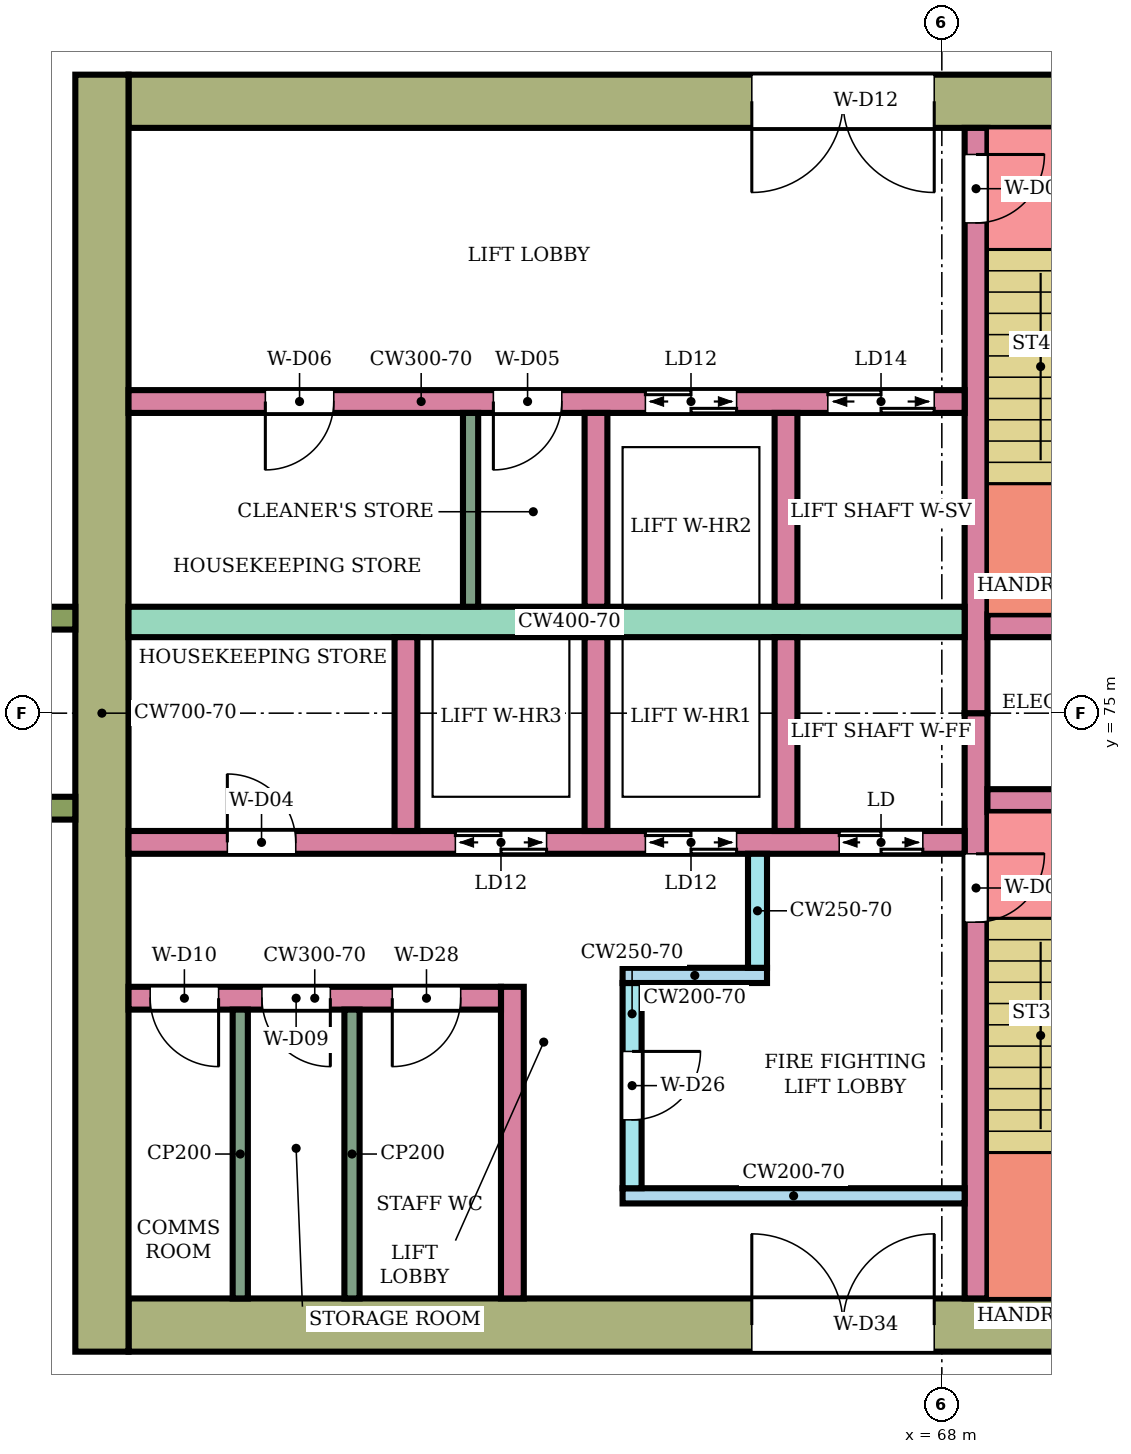
"""IFC4 building model, lengths in metres.
Left out: names, types, materials, properties, quantities, classifications, styles, units other than length and angle.
Written with IfcOpenShell. Run it as: python <this file> out.ifc"""

import sys

from ifc_helpers import new_model, si_unit, direction, frame, frame_2d, origin, place, context, subcontext, project, spatial, rectangle, extrude, element, fill, save


model = new_model("IFC4")
c1 = context("Model", 3, precision=1e-05, world=origin(), true_north=direction((0.0, 1.0)))
c2 = subcontext(c1, "Body", "Model", "MODEL_VIEW")
j1 = project(units=[si_unit("LENGTHUNIT", "METRE"), si_unit("PLANEANGLEUNIT", "RADIAN")], contexts=[c1])
p1 = place(None, origin())
s1 = spatial("IfcSite", under=j1, at=p1, CompositionType="ELEMENT")
p2 = place(p1, origin())
s2 = spatial("IfcBuilding", under=s1, at=p2, CompositionType="ELEMENT")
p3 = place(p2, frame((0.0, 0.0, 194.6)))
s3 = spatial("IfcBuildingStorey", under=s2, at=p3, CompositionType="ELEMENT", Elevation=194.6)
p4 = place(p3, frame((72.1, 66.95, 0.0), z_axis=(0.0, 0.0, 1.0), x_axis=(-1.0, 0.0, 0.0)))
e1 = element("IfcWall", 1, at=p4, inside=s3, PredefinedType="SHEAR", context=c2, shape_type="SweptSolid", body=[
    extrude(rectangle(XDim=14.8, YDim=0.7, at=frame_2d((7.4, 0.0))), origin(), (0.0, 0.0, 1.0), 3.78),
])
p5 = place(p4, frame((4.2, 0.0, 0.0)))
e2 = element("IfcOpeningElement", 2, at=p5, cuts=e1, PredefinedType="OPENING", context=c2, shape_type="SweptSolid", body=[
    extrude(rectangle(XDim=2.4, YDim=2.4, at=frame_2d((1.2, 1.2))), frame((0.0, 0.36, 0.0), z_axis=(0.0, -1.0, 0.0), x_axis=(1.0, 0.0, 0.0)), (0.0, 0.0, 1.0), 0.72),
])
p6 = place(p3, frame((72.1, 83.05, 0.0), z_axis=(0.0, 0.0, 1.0), x_axis=(-1.0, 0.0, 0.0)))
e3 = element("IfcWall", 3, at=p6, inside=s3, PredefinedType="SHEAR", context=c2, shape_type="SweptSolid", body=[
    extrude(rectangle(XDim=14.8, YDim=0.7, at=frame_2d((7.4, 0.0))), origin(), (0.0, 0.0, 1.0), 3.78),
])
p7 = place(p6, frame((4.2, 0.0, 0.0)))
e4 = element("IfcOpeningElement", 4, at=p7, cuts=e3, PredefinedType="OPENING", context=c2, shape_type="SweptSolid", body=[
    extrude(rectangle(XDim=2.4, YDim=2.4, at=frame_2d((1.2, 1.2))), frame((0.0, 0.36, 0.0), z_axis=(0.0, -1.0, 0.0), x_axis=(1.0, 0.0, 0.0)), (0.0, 0.0, 1.0), 0.72),
])
p8 = place(p3, frame((56.95, 83.4, 0.0), z_axis=(0.0, 0.0, 1.0), x_axis=(0.0, -1.0, 0.0)))
e5 = element("IfcWall", 5, at=p8, inside=s3, PredefinedType="SHEAR", context=c2, shape_type="SweptSolid", body=[
    extrude(rectangle(XDim=16.8, YDim=0.7, at=frame_2d((8.4, 0.0))), origin(), (0.0, 0.0, 1.0), 3.78),
])
p9 = place(p3, frame((68.45, 75.0, 0.0), z_axis=(0.0, 0.0, 1.0), x_axis=(0.0, -1.0, 0.0)))
e6 = element("IfcWall", 6, at=p9, inside=s3, PredefinedType="SHEAR", context=c2, shape_type="SweptSolid", body=[
    extrude(rectangle(XDim=7.7, YDim=0.3, at=frame_2d((3.85, 0.0))), origin(), (0.0, 0.0, 1.0), 3.78),
])
p10 = place(p9, frame((1.85, 0.0, 0.0)))
e7 = element("IfcOpeningElement", 7, at=p10, cuts=e6, PredefinedType="OPENING", context=c2, shape_type="SweptSolid", body=[
    extrude(rectangle(XDim=0.9, YDim=2.1, at=frame_2d((0.45, 1.05))), frame((0.0, 0.16, 0.0), z_axis=(0.0, -1.0, 0.0), x_axis=(1.0, 0.0, 0.0)), (0.0, 0.0, 1.0), 0.32),
])
p11 = place(p3, frame((68.45, 82.7, 0.0), z_axis=(0.0, 0.0, 1.0), x_axis=(0.0, -1.0, 0.0)))
e8 = element("IfcWall", 8, at=p11, inside=s3, PredefinedType="SHEAR", context=c2, shape_type="SweptSolid", body=[
    extrude(rectangle(XDim=7.7, YDim=0.3, at=frame_2d((3.85, 0.0))), origin(), (0.0, 0.0, 1.0), 3.78),
])
p12 = place(p11, frame((0.35, 0.0, 0.0)))
e9 = element("IfcOpeningElement", 9, at=p12, cuts=e8, PredefinedType="OPENING", context=c2, shape_type="SweptSolid", body=[
    extrude(rectangle(XDim=0.9, YDim=2.1, at=frame_2d((0.45, 1.05))), frame((0.0, 0.16, 0.0), z_axis=(0.0, -1.0, 0.0), x_axis=(1.0, 0.0, 0.0)), (0.0, 0.0, 1.0), 0.32),
])
p13 = place(p3, frame((71.65, 73.85, 0.0), z_axis=(0.0, 0.0, 1.0), x_axis=(-1.0, 0.0, 0.0)))
e10 = element("IfcWall", 10, at=p13, inside=s3, PredefinedType="SHEAR", context=c2, shape_type="SweptSolid", body=[
    extrude(rectangle(XDim=3.05, YDim=0.3, at=frame_2d((1.525, 0.0))), origin(), (0.0, 0.0, 1.0), 3.78),
])
p14 = place(p13, frame((1.1, 0.0, 0.0)))
e11 = element("IfcOpeningElement", 11, at=p14, cuts=e10, PredefinedType="OPENING", context=c2, shape_type="SweptSolid", body=[
    extrude(rectangle(XDim=0.7, YDim=2.0, at=frame_2d((0.35, 1.0))), frame((0.0, 0.16, 0.0), z_axis=(0.0, -1.0, 0.0), x_axis=(1.0, 0.0, 0.0)), (0.0, 0.0, 1.0), 0.32),
])
p15 = place(p3, frame((71.65, 76.15, 0.0), z_axis=(0.0, 0.0, 1.0), x_axis=(-1.0, 0.0, 0.0)))
e12 = element("IfcWall", 12, at=p15, inside=s3, PredefinedType="SHEAR", context=c2, shape_type="SweptSolid", body=[
    extrude(rectangle(XDim=3.05, YDim=0.3, at=frame_2d((1.525, 0.0))), origin(), (0.0, 0.0, 1.0), 3.78),
])
p16 = place(p3, frame((68.3, 73.3, 0.0), z_axis=(0.0, 0.0, 1.0), x_axis=(-1.0, 0.0, 0.0)))
e13 = element("IfcWall", 13, at=p16, inside=s3, PredefinedType="SHEAR", context=c2, shape_type="SweptSolid", body=[
    extrude(rectangle(XDim=11.0, YDim=0.3, at=frame_2d((5.5, 0.0))), origin(), (0.0, 0.0, 1.0), 3.78),
])
p17 = place(p16, frame((0.55, 0.0, 0.0)))
e14 = element("IfcOpeningElement", 14, at=p17, cuts=e13, PredefinedType="OPENING", context=c2, shape_type="SweptSolid", body=[
    extrude(rectangle(XDim=1.1, YDim=2.1, at=frame_2d((0.55, 1.05))), frame((0.0, 0.16, 0.0), z_axis=(0.0, -1.0, 0.0), x_axis=(1.0, 0.0, 0.0)), (0.0, 0.0, 1.0), 0.32),
])
p18 = place(p16, frame((3.0, 0.0, 0.0)))
e15 = element("IfcOpeningElement", 15, at=p18, cuts=e13, PredefinedType="OPENING", context=c2, shape_type="SweptSolid", body=[
    extrude(rectangle(XDim=1.2, YDim=2.1, at=frame_2d((0.6, 1.05))), frame((0.0, 0.16, 0.0), z_axis=(0.0, -1.0, 0.0), x_axis=(1.0, 0.0, 0.0)), (0.0, 0.0, 1.0), 0.32),
])
p19 = place(p16, frame((5.5, 0.0, 0.0)))
e16 = element("IfcOpeningElement", 16, at=p19, cuts=e13, PredefinedType="OPENING", context=c2, shape_type="SweptSolid", body=[
    extrude(rectangle(XDim=1.2, YDim=2.1, at=frame_2d((0.6, 1.05))), frame((0.0, 0.16, 0.0), z_axis=(0.0, -1.0, 0.0), x_axis=(1.0, 0.0, 0.0)), (0.0, 0.0, 1.0), 0.32),
])
p20 = place(p16, frame((8.8, 0.0, 0.0)))
e17 = element("IfcOpeningElement", 17, at=p20, cuts=e13, PredefinedType="OPENING", context=c2, shape_type="SweptSolid", body=[
    extrude(rectangle(XDim=0.9, YDim=2.1, at=frame_2d((0.45, 1.05))), frame((0.0, 0.16, 0.0), z_axis=(0.0, -1.0, 0.0), x_axis=(1.0, 0.0, 0.0)), (0.0, 0.0, 1.0), 0.32),
])
p21 = place(p3, frame((68.3, 76.2, 0.0), z_axis=(0.0, 0.0, 1.0), x_axis=(-1.0, 0.0, 0.0)))
e18 = element("IfcWall", 18, at=p21, inside=s3, PredefinedType="SHEAR", context=c2, shape_type="SweptSolid", body=[
    extrude(rectangle(XDim=11.0, YDim=0.4, at=frame_2d((5.5, 0.0))), origin(), (0.0, 0.0, 1.0), 3.78),
])
p22 = place(p3, frame((68.3, 79.1, 0.0), z_axis=(0.0, 0.0, 1.0), x_axis=(-1.0, 0.0, 0.0)))
e19 = element("IfcWall", 19, at=p22, inside=s3, PredefinedType="SHEAR", context=c2, shape_type="SweptSolid", body=[
    extrude(rectangle(XDim=11.0, YDim=0.3, at=frame_2d((5.5, 0.0))), origin(), (0.0, 0.0, 1.0), 3.78),
])
p23 = place(p22, frame((0.4, 0.0, 0.0)))
e20 = element("IfcOpeningElement", 20, at=p23, cuts=e19, PredefinedType="OPENING", context=c2, shape_type="SweptSolid", body=[
    extrude(rectangle(XDim=1.4, YDim=2.1, at=frame_2d((0.7, 1.05))), frame((0.0, 0.16, 0.0), z_axis=(0.0, -1.0, 0.0), x_axis=(1.0, 0.0, 0.0)), (0.0, 0.0, 1.0), 0.32),
])
p24 = place(p22, frame((3.0, 0.0, 0.0)))
e21 = element("IfcOpeningElement", 21, at=p24, cuts=e19, PredefinedType="OPENING", context=c2, shape_type="SweptSolid", body=[
    extrude(rectangle(XDim=1.2, YDim=2.1, at=frame_2d((0.6, 1.05))), frame((0.0, 0.16, 0.0), z_axis=(0.0, -1.0, 0.0), x_axis=(1.0, 0.0, 0.0)), (0.0, 0.0, 1.0), 0.32),
])
p25 = place(p22, frame((5.3, 0.0, 0.0)))
e22 = element("IfcOpeningElement", 22, at=p25, cuts=e19, PredefinedType="OPENING", context=c2, shape_type="SweptSolid", body=[
    extrude(rectangle(XDim=0.9, YDim=2.1, at=frame_2d((0.45, 1.05))), frame((0.0, 0.16, 0.0), z_axis=(0.0, -1.0, 0.0), x_axis=(1.0, 0.0, 0.0)), (0.0, 0.0, 1.0), 0.32),
])
p26 = place(p22, frame((8.3, 0.0, 0.0)))
e23 = element("IfcOpeningElement", 23, at=p26, cuts=e19, PredefinedType="OPENING", context=c2, shape_type="SweptSolid", body=[
    extrude(rectangle(XDim=0.9, YDim=2.1, at=frame_2d((0.45, 1.05))), frame((0.0, 0.16, 0.0), z_axis=(0.0, -1.0, 0.0), x_axis=(1.0, 0.0, 0.0)), (0.0, 0.0, 1.0), 0.32),
])
for number, where, z_axis, x_axis in (
    (24, (65.95, 76.0, 0.0), (0.0, 0.0, 1.0), (0.0, -1.0, 0.0)),
    (25, (63.45, 76.0, 0.0), (0.0, 0.0, 1.0), (0.0, -1.0, 0.0)),
    (26, (60.95, 76.0, 0.0), (0.0, 0.0, 1.0), (0.0, -1.0, 0.0)),
    (27, (65.95, 78.95, 0.0), (0.0, 0.0, 1.0), (0.0, -1.0, 0.0)),
    (28, (63.45, 78.95, 0.0), (0.0, 0.0, 1.0), (0.0, -1.0, 0.0)),
):
    element("IfcWall", number, at=place(p3, frame(where, z_axis=z_axis, x_axis=x_axis)), inside=s3, PredefinedType="SHEAR", context=c2, shape_type="SweptSolid", body=[
        extrude(rectangle(XDim=2.55, YDim=0.3, at=frame_2d((1.275, 0.0))), origin(), (0.0, 0.0, 1.0), 3.78),
    ])
p27 = place(p3, frame((68.3, 68.65, 0.0), z_axis=(0.0, 0.0, 1.0), x_axis=(-1.0, 0.0, 0.0)))
e29 = element("IfcWall", 29, at=p27, inside=s3, PredefinedType="SHEAR", context=c2, shape_type="SweptSolid", body=[
    extrude(rectangle(XDim=4.5, YDim=0.2, at=frame_2d((2.25, 0.0))), origin(), (0.0, 0.0, 1.0), 3.78),
])
p28 = place(p3, frame((63.925, 71.45, 0.0), z_axis=(0.0, 0.0, 1.0), x_axis=(0.0, -1.0, 0.0)))
e30 = element("IfcWall", 30, at=p28, inside=s3, PredefinedType="SHEAR", context=c2, shape_type="SweptSolid", body=[
    extrude(rectangle(XDim=2.7, YDim=0.25, at=frame_2d((1.35, 0.0))), origin(), (0.0, 0.0, 1.0), 3.78),
])
p29 = place(p28, frame((0.9, 0.0, 0.0)))
e31 = element("IfcOpeningElement", 31, at=p29, cuts=e30, PredefinedType="OPENING", context=c2, shape_type="SweptSolid", body=[
    extrude(rectangle(XDim=0.9, YDim=2.1, at=frame_2d((0.45, 1.05))), frame((0.0, 0.135, 0.0), z_axis=(0.0, -1.0, 0.0), x_axis=(1.0, 0.0, 0.0)), (0.0, 0.0, 1.0), 0.27),
])
p30 = place(p3, frame((65.7, 71.55, 0.0), z_axis=(0.0, 0.0, 1.0), x_axis=(-1.0, 0.0, 0.0)))
e32 = element("IfcWall", 32, at=p30, inside=s3, PredefinedType="SHEAR", context=c2, shape_type="SweptSolid", body=[
    extrude(rectangle(XDim=1.9, YDim=0.2, at=frame_2d((0.95, 0.0))), origin(), (0.0, 0.0, 1.0), 3.78),
])
p31 = place(p3, frame((65.575, 73.15, 0.0), z_axis=(0.0, 0.0, 1.0), x_axis=(0.0, -1.0, 0.0)))
e33 = element("IfcWall", 33, at=p31, inside=s3, PredefinedType="SHEAR", context=c2, shape_type="SweptSolid", body=[
    extrude(rectangle(XDim=1.5, YDim=0.25, at=frame_2d((0.75, 0.0))), origin(), (0.0, 0.0, 1.0), 3.78),
])
p32 = place(p3, frame((62.35, 71.4, 0.0), z_axis=(0.0, 0.0, 1.0), x_axis=(0.0, -1.0, 0.0)))
e34 = element("IfcWall", 34, at=p32, inside=s3, PredefinedType="SHEAR", context=c2, shape_type="SweptSolid", body=[
    extrude(rectangle(XDim=4.1, YDim=0.3, at=frame_2d((2.05, 0.0))), origin(), (0.0, 0.0, 1.0), 3.78),
])
p33 = place(p3, frame((62.2, 71.25, 0.0), z_axis=(0.0, 0.0, 1.0), x_axis=(-1.0, 0.0, 0.0)))
e35 = element("IfcWall", 35, at=p33, inside=s3, PredefinedType="SHEAR", context=c2, shape_type="SweptSolid", body=[
    extrude(rectangle(XDim=4.9, YDim=0.3, at=frame_2d((2.45, 0.0))), origin(), (0.0, 0.0, 1.0), 3.78),
])
p34 = place(p33, frame((0.53, 0.0, 0.0)))
e36 = element("IfcOpeningElement", 36, at=p34, cuts=e35, PredefinedType="OPENING", context=c2, shape_type="SweptSolid", body=[
    extrude(rectangle(XDim=0.9, YDim=2.1, at=frame_2d((0.45, 1.05))), frame((0.0, 0.16, 0.0), z_axis=(0.0, -1.0, 0.0), x_axis=(1.0, 0.0, 0.0)), (0.0, 0.0, 1.0), 0.32),
])
p35 = place(p33, frame((2.245, 0.0, 0.0)))
e37 = element("IfcOpeningElement", 37, at=p35, cuts=e35, PredefinedType="OPENING", context=c2, shape_type="SweptSolid", body=[
    extrude(rectangle(XDim=0.9, YDim=2.1, at=frame_2d((0.45, 1.05))), frame((0.0, 0.16, 0.0), z_axis=(0.0, -1.0, 0.0), x_axis=(1.0, 0.0, 0.0)), (0.0, 0.0, 1.0), 0.32),
])
p36 = place(p33, frame((3.715, 0.0, 0.0)))
e38 = element("IfcOpeningElement", 38, at=p36, cuts=e35, PredefinedType="OPENING", context=c2, shape_type="SweptSolid", body=[
    extrude(rectangle(XDim=0.9, YDim=2.1, at=frame_2d((0.45, 1.05))), frame((0.0, 0.16, 0.0), z_axis=(0.0, -1.0, 0.0), x_axis=(1.0, 0.0, 0.0)), (0.0, 0.0, 1.0), 0.32),
])
for number, where, z_axis, x_axis in (
    (39, (56.6, 76.25, 0.0), (0.0, 0.0, 1.0), (-1.0, 0.0, 0.0)),
    (40, (56.6, 73.75, 0.0), (0.0, 0.0, 1.0), (-1.0, 0.0, 0.0)),
):
    element("IfcWall", number, at=place(p3, frame(where, z_axis=z_axis, x_axis=x_axis)), inside=s3, PredefinedType="NOTDEFINED", context=c2, shape_type="SweptSolid", body=[
        extrude(rectangle(XDim=2.416, YDim=0.3, at=frame_2d((1.208, 0.0))), origin(), (0.0, 0.0, 1.0), 4.1),
    ])
p37 = place(p3, frame((61.8, 78.95, 0.0), z_axis=(0.0, 0.0, 1.0), x_axis=(0.0, -1.0, 0.0)))
e41 = element("IfcWall", 41, at=p37, inside=s3, PredefinedType="PARTITIONING", context=c2, shape_type="SweptSolid", body=[
    extrude(rectangle(XDim=2.55, YDim=0.2, at=frame_2d((1.275, 0.0))), origin(), (0.0, 0.0, 1.0), 3.78),
])
for number, where, z_axis, x_axis in (
    (42, (60.24, 71.1, 0.0), (0.0, 0.0, 1.0), (0.0, -1.0, 0.0)),
    (43, (58.77, 71.1, 0.0), (0.0, 0.0, 1.0), (0.0, -1.0, 0.0)),
):
    element("IfcWall", number, at=place(p3, frame(where, z_axis=z_axis, x_axis=x_axis)), inside=s3, PredefinedType="PARTITIONING", context=c2, shape_type="SweptSolid", body=[
        extrude(rectangle(XDim=3.8, YDim=0.2, at=frame_2d((1.9, 0.0))), origin(), (0.0, 0.0, 1.0), 3.78),
    ])
p38 = place(p10, origin())
e44 = element("IfcDoor", 44, at=p38, inside=s3, OperationType="SINGLE_SWING_LEFT", PredefinedType="DOOR", context=c2, shape_type="SweptSolid", body=[
    extrude(rectangle(XDim=0.9, YDim=2.1, at=frame_2d((0.45, 1.05))), frame((0.0, 0.025, 0.0), z_axis=(0.0, -1.0, 0.0), x_axis=(1.0, 0.0, 0.0)), (0.0, 0.0, 1.0), 0.05),
])
fill(e7, e44)
p39 = place(p12, origin())
e45 = element("IfcDoor", 45, at=p39, inside=s3, OperationType="SINGLE_SWING_LEFT", PredefinedType="DOOR", context=c2, shape_type="SweptSolid", body=[
    extrude(rectangle(XDim=0.9, YDim=2.1, at=frame_2d((0.45, 1.05))), frame((0.0, 0.025, 0.0), z_axis=(0.0, -1.0, 0.0), x_axis=(1.0, 0.0, 0.0)), (0.0, 0.0, 1.0), 0.05),
])
fill(e9, e45)
p40 = place(p17, origin())
e46 = element("IfcDoor", 46, at=p40, inside=s3, OperationType="DOUBLE_DOOR_SLIDING", PredefinedType="DOOR", context=c2, shape_type="SweptSolid", body=[
    extrude(rectangle(XDim=1.1, YDim=2.1, at=frame_2d((0.55, 1.05))), frame((0.0, 0.025, 0.0), z_axis=(0.0, -1.0, 0.0), x_axis=(1.0, 0.0, 0.0)), (0.0, 0.0, 1.0), 0.05),
])
fill(e14, e46)
p41 = place(p18, origin())
e47 = element("IfcDoor", 47, at=p41, inside=s3, OperationType="DOUBLE_DOOR_SLIDING", PredefinedType="DOOR", context=c2, shape_type="SweptSolid", body=[
    extrude(rectangle(XDim=1.2, YDim=2.1, at=frame_2d((0.6, 1.05))), frame((0.0, 0.025, 0.0), z_axis=(0.0, -1.0, 0.0), x_axis=(1.0, 0.0, 0.0)), (0.0, 0.0, 1.0), 0.05),
])
fill(e15, e47)
p42 = place(p19, origin())
e48 = element("IfcDoor", 48, at=p42, inside=s3, OperationType="DOUBLE_DOOR_SLIDING", PredefinedType="DOOR", context=c2, shape_type="SweptSolid", body=[
    extrude(rectangle(XDim=1.2, YDim=2.1, at=frame_2d((0.6, 1.05))), frame((0.0, 0.025, 0.0), z_axis=(0.0, -1.0, 0.0), x_axis=(1.0, 0.0, 0.0)), (0.0, 0.0, 1.0), 0.05),
])
fill(e16, e48)
p43 = place(p20, frame((0.9, 0.0, 0.0), z_axis=(0.0, 0.0, 1.0), x_axis=(-1.0, 0.0, 0.0)))
e49 = element("IfcDoor", 49, at=p43, inside=s3, OperationType="SINGLE_SWING_LEFT", PredefinedType="DOOR", context=c2, shape_type="SweptSolid", body=[
    extrude(rectangle(XDim=0.9, YDim=2.1, at=frame_2d((0.45, 1.05))), frame((0.0, 0.025, 0.0), z_axis=(0.0, -1.0, 0.0), x_axis=(1.0, 0.0, 0.0)), (0.0, 0.0, 1.0), 0.05),
])
fill(e17, e49)
p44 = place(p23, origin())
e50 = element("IfcDoor", 50, at=p44, inside=s3, OperationType="DOUBLE_DOOR_SLIDING", PredefinedType="DOOR", context=c2, shape_type="SweptSolid", body=[
    extrude(rectangle(XDim=1.4, YDim=2.1, at=frame_2d((0.7, 1.05))), frame((0.0, 0.025, 0.0), z_axis=(0.0, -1.0, 0.0), x_axis=(1.0, 0.0, 0.0)), (0.0, 0.0, 1.0), 0.05),
])
fill(e20, e50)
p45 = place(p24, origin())
e51 = element("IfcDoor", 51, at=p45, inside=s3, OperationType="DOUBLE_DOOR_SLIDING", PredefinedType="DOOR", context=c2, shape_type="SweptSolid", body=[
    extrude(rectangle(XDim=1.2, YDim=2.1, at=frame_2d((0.6, 1.05))), frame((0.0, 0.025, 0.0), z_axis=(0.0, -1.0, 0.0), x_axis=(1.0, 0.0, 0.0)), (0.0, 0.0, 1.0), 0.05),
])
fill(e21, e51)
p46 = place(p25, origin())
e52 = element("IfcDoor", 52, at=p46, inside=s3, OperationType="SINGLE_SWING_RIGHT", PredefinedType="DOOR", context=c2, shape_type="SweptSolid", body=[
    extrude(rectangle(XDim=0.9, YDim=2.1, at=frame_2d((0.45, 1.05))), frame((0.0, 0.025, 0.0), z_axis=(0.0, -1.0, 0.0), x_axis=(1.0, 0.0, 0.0)), (0.0, 0.0, 1.0), 0.05),
])
fill(e22, e52)
p47 = place(p26, origin())
e53 = element("IfcDoor", 53, at=p47, inside=s3, OperationType="SINGLE_SWING_RIGHT", PredefinedType="DOOR", context=c2, shape_type="SweptSolid", body=[
    extrude(rectangle(XDim=0.9, YDim=2.1, at=frame_2d((0.45, 1.05))), frame((0.0, 0.025, 0.0), z_axis=(0.0, -1.0, 0.0), x_axis=(1.0, 0.0, 0.0)), (0.0, 0.0, 1.0), 0.05),
])
fill(e23, e53)
p48 = place(p29, origin())
e54 = element("IfcDoor", 54, at=p48, inside=s3, OperationType="SINGLE_SWING_LEFT", PredefinedType="DOOR", context=c2, shape_type="SweptSolid", body=[
    extrude(rectangle(XDim=0.9, YDim=2.1, at=frame_2d((0.45, 1.05))), frame((0.0, 0.025, 0.0), z_axis=(0.0, -1.0, 0.0), x_axis=(1.0, 0.0, 0.0)), (0.0, 0.0, 1.0), 0.05),
])
fill(e31, e54)
p49 = place(p34, origin())
e55 = element("IfcDoor", 55, at=p49, inside=s3, OperationType="SINGLE_SWING_RIGHT", PredefinedType="DOOR", context=c2, shape_type="SweptSolid", body=[
    extrude(rectangle(XDim=0.9, YDim=2.1, at=frame_2d((0.45, 1.05))), frame((0.0, 0.025, 0.0), z_axis=(0.0, -1.0, 0.0), x_axis=(1.0, 0.0, 0.0)), (0.0, 0.0, 1.0), 0.05),
])
fill(e36, e55)
p50 = place(p35, origin())
e56 = element("IfcDoor", 56, at=p50, inside=s3, OperationType="SINGLE_SWING_LEFT", PredefinedType="DOOR", context=c2, shape_type="SweptSolid", body=[
    extrude(rectangle(XDim=0.9, YDim=2.1, at=frame_2d((0.45, 1.05))), frame((0.0, 0.025, 0.0), z_axis=(0.0, -1.0, 0.0), x_axis=(1.0, 0.0, 0.0)), (0.0, 0.0, 1.0), 0.05),
])
fill(e37, e56)
p51 = place(p36, origin())
e57 = element("IfcDoor", 57, at=p51, inside=s3, OperationType="SINGLE_SWING_LEFT", PredefinedType="DOOR", context=c2, shape_type="SweptSolid", body=[
    extrude(rectangle(XDim=0.9, YDim=2.1, at=frame_2d((0.45, 1.05))), frame((0.0, 0.025, 0.0), z_axis=(0.0, -1.0, 0.0), x_axis=(1.0, 0.0, 0.0)), (0.0, 0.0, 1.0), 0.05),
])
fill(e38, e57)
p52 = place(p5, frame((2.4, 0.0, 0.0), z_axis=(0.0, 0.0, 1.0), x_axis=(-1.0, 0.0, 0.0)))
e58 = element("IfcDoor", 58, at=p52, inside=s3, OperationType="DOUBLE_DOOR_SINGLE_SWING", PredefinedType="DOOR", context=c2, shape_type="SweptSolid", body=[
    extrude(rectangle(XDim=2.4, YDim=2.4, at=frame_2d((1.2, 1.2))), frame((0.0, 0.025, 0.0), z_axis=(0.0, -1.0, 0.0), x_axis=(1.0, 0.0, 0.0)), (0.0, 0.0, 1.0), 0.05),
])
fill(e2, e58)
p53 = place(p7, origin())
e59 = element("IfcDoor", 59, at=p53, inside=s3, OperationType="DOUBLE_DOOR_SINGLE_SWING", PredefinedType="DOOR", context=c2, shape_type="SweptSolid", body=[
    extrude(rectangle(XDim=2.4, YDim=2.4, at=frame_2d((1.2, 1.2))), frame((0.0, 0.025, 0.0), z_axis=(0.0, -1.0, 0.0), x_axis=(1.0, 0.0, 0.0)), (0.0, 0.0, 1.0), 0.05),
])
fill(e4, e59)
save(model, sys.argv[1])
